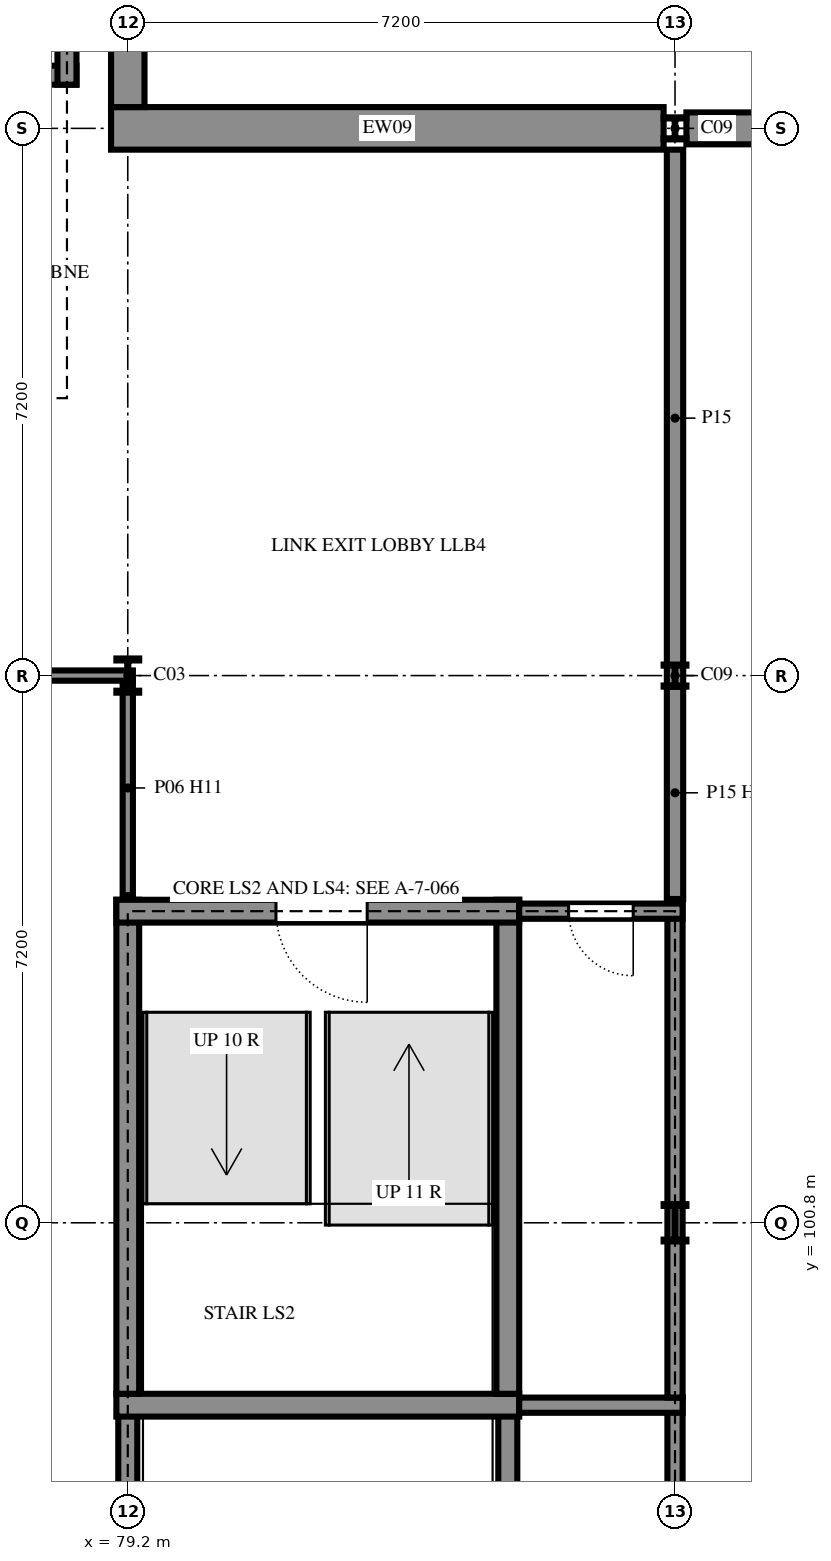
"""IFC4 building model, lengths in metres.
Left out: names, types, materials, properties, quantities, classifications, styles, units other than length and angle.
Written with IfcOpenShell. Run it as: python <this file> out.ifc"""

import sys

from ifc_helpers import new_model, si_unit, direction, frame, frame_2d, origin, origin_2d, place, context, subcontext, project, spatial, rectangle, i_section, extrude, element, fill, save


model = new_model("IFC4")
c1 = context("Model", 3, precision=1e-05, world=origin(), true_north=direction((0.0, 1.0)))
c2 = subcontext(c1, "Body", "Model", "MODEL_VIEW")
j1 = project(units=[si_unit("LENGTHUNIT", "METRE"), si_unit("PLANEANGLEUNIT", "RADIAN")], contexts=[c1])
p1 = place(None, origin())
s1 = spatial("IfcSite", under=j1, at=p1, CompositionType="ELEMENT")
p2 = place(p1, origin())
s2 = spatial("IfcBuilding", under=s1, at=p2, CompositionType="ELEMENT")
p3 = place(p2, frame((0.0, 0.0, 10.8)))
s3 = spatial("IfcBuildingStorey", under=s2, at=p3, CompositionType="ELEMENT", Elevation=10.8)
p4 = place(p3, frame((79.2, 108.0, 0.0), z_axis=(0.0, 0.0, 1.0), x_axis=(1.0, 0.0, 0.0)))
e1 = element("IfcColumn", 1, at=p4, inside=s3, PredefinedType="COLUMN", context=c2, shape_type="SweptSolid", body=[
    extrude(i_section(OverallWidth=0.3, OverallDepth=0.45, WebThickness=0.014, FlangeThickness=0.026, FilletRadius=0.027, at=origin_2d()), origin(), (0.0, 0.0, 1.0), 3.6),
])
p5 = place(p3, frame((86.4, 100.8, 0.0), z_axis=(0.0, 0.0, 1.0), x_axis=(1.0, 0.0, 0.0)))
e2 = element("IfcColumn", 2, at=p5, inside=s3, PredefinedType="COLUMN", context=c2, shape_type="SweptSolid", body=[
    extrude(i_section(OverallWidth=0.3, OverallDepth=0.49, WebThickness=0.012, FlangeThickness=0.023, FilletRadius=0.027, at=origin_2d()), origin(), (0.0, 0.0, 1.0), 3.6),
])
for number, where, z_axis, x_axis in (
    (3, (86.4, 108.0, 0.0), (0.0, 0.0, 1.0), (1.0, 0.0, 0.0)),
    (4, (86.4, 115.2, 0.0), (0.0, 0.0, 1.0), (1.0, 0.0, 0.0)),
):
    element("IfcColumn", number, at=place(p3, frame(where, z_axis=z_axis, x_axis=x_axis)), inside=s3, PredefinedType="COLUMN", context=c2, shape_type="SweptSolid", body=[
        extrude(i_section(OverallWidth=0.3, OverallDepth=0.29, WebThickness=0.009, FlangeThickness=0.014, FilletRadius=0.027, at=origin_2d()), origin(), (0.0, 0.0, 1.0), 3.6),
    ])
p6 = place(p3, frame((84.2, 91.775, 0.0), z_axis=(0.0, 0.0, 1.0), x_axis=(0.0, 1.0, 0.0)))
e5 = element("IfcWall", 5, at=p6, inside=s3, PredefinedType="SHEAR", context=c2, shape_type="SweptSolid", body=[
    extrude(rectangle(XDim=6.775, YDim=0.25, at=frame_2d((3.388, 0.0))), origin(), (0.0, 0.0, 1.0), 3.6),
])
p7 = place(p3, frame((86.4, 91.8, 0.0), z_axis=(0.0, 0.0, 1.0), x_axis=(0.0, 1.0, 0.0)))
e6 = element("IfcWall", 6, at=p7, inside=s3, PredefinedType="SHEAR", context=c2, shape_type="SweptSolid", body=[
    extrude(rectangle(XDim=6.7, YDim=0.2, at=frame_2d((3.35, 0.0))), origin(), (0.0, 0.0, 1.0), 3.6),
])
p8 = place(p3, frame((79.2, 98.55, 0.0), z_axis=(0.0, 0.0, 1.0), x_axis=(0.0, -1.0, 0.0)))
e7 = element("IfcWall", 7, at=p8, inside=s3, PredefinedType="SHEAR", context=c2, shape_type="SweptSolid", body=[
    extrude(rectangle(XDim=6.775, YDim=0.25, at=frame_2d((3.388, 0.0))), origin(), (0.0, 0.0, 1.0), 3.6),
])
p9 = place(p3, frame((84.35, 98.4, 0.0), z_axis=(0.0, 0.0, 1.0), x_axis=(-1.0, 0.0, 0.0)))
e8 = element("IfcWall", 8, at=p9, inside=s3, PredefinedType="SHEAR", context=c2, shape_type="SweptSolid", body=[
    extrude(rectangle(XDim=5.3, YDim=0.3, at=frame_2d((2.65, 0.0))), origin(), (0.0, 0.0, 1.0), 3.6),
])
p10 = place(p3, frame((84.35, 98.4, 0.0), z_axis=(0.0, 0.0, 1.0), x_axis=(1.0, 0.0, 0.0)))
e9 = element("IfcWall", 9, at=p10, inside=s3, PredefinedType="SHEAR", context=c2, shape_type="SweptSolid", body=[
    extrude(rectangle(XDim=2.15, YDim=0.2, at=frame_2d((1.075, 0.0))), origin(), (0.0, 0.0, 1.0), 3.6),
])
p11 = place(p3, frame((84.2, 98.55, 0.0), z_axis=(0.0, 0.0, 1.0), x_axis=(0.0, 1.0, 0.0)))
e10 = element("IfcWall", 10, at=p11, inside=s3, PredefinedType="SHEAR", context=c2, shape_type="SweptSolid", body=[
    extrude(rectangle(XDim=6.5, YDim=0.3, at=frame_2d((3.25, 0.0))), origin(), (0.0, 0.0, 1.0), 3.6),
])
p12 = place(p3, frame((86.4, 98.5, 0.0), z_axis=(0.0, 0.0, 1.0), x_axis=(0.0, 1.0, 0.0)))
e11 = element("IfcWall", 11, at=p12, inside=s3, PredefinedType="SHEAR", context=c2, shape_type="SweptSolid", body=[
    extrude(rectangle(XDim=6.5, YDim=0.2, at=frame_2d((3.25, 0.0))), origin(), (0.0, 0.0, 1.0), 3.6),
])
p13 = place(p3, frame((79.2, 105.05, 0.0), z_axis=(0.0, 0.0, 1.0), x_axis=(0.0, -1.0, 0.0)))
e12 = element("IfcWall", 12, at=p13, inside=s3, PredefinedType="SHEAR", context=c2, shape_type="SweptSolid", body=[
    extrude(rectangle(XDim=6.5, YDim=0.3, at=frame_2d((3.25, 0.0))), origin(), (0.0, 0.0, 1.0), 3.6),
])
p14 = place(p3, frame((84.35, 104.9, 0.0), z_axis=(0.0, 0.0, 1.0), x_axis=(-1.0, 0.0, 0.0)))
e13 = element("IfcWall", 13, at=p14, inside=s3, PredefinedType="SHEAR", context=c2, shape_type="SweptSolid", body=[
    extrude(rectangle(XDim=5.3, YDim=0.3, at=frame_2d((2.65, 0.0))), origin(), (0.0, 0.0, 1.0), 3.6),
])
p15 = place(p14, frame((2.0, 0.0, 0.0)))
e14 = element("IfcOpeningElement", 14, at=p15, cuts=e13, PredefinedType="OPENING", context=c2, shape_type="SweptSolid", body=[
    extrude(rectangle(XDim=1.2, YDim=2.4, at=frame_2d((0.6, 1.2))), frame((0.0, 0.16, 0.0), z_axis=(0.0, -1.0, 0.0), x_axis=(1.0, 0.0, 0.0)), (0.0, 0.0, 1.0), 0.32),
])
p16 = place(p3, frame((86.5, 104.9, 0.0), z_axis=(0.0, 0.0, 1.0), x_axis=(-1.0, 0.0, 0.0)))
e15 = element("IfcWall", 15, at=p16, inside=s3, PredefinedType="SHEAR", context=c2, shape_type="SweptSolid", body=[
    extrude(rectangle(XDim=2.15, YDim=0.2, at=frame_2d((1.075, 0.0))), origin(), (0.0, 0.0, 1.0), 3.6),
])
p17 = place(p16, frame((0.65, 0.0, 0.0)))
e16 = element("IfcOpeningElement", 16, at=p17, cuts=e15, PredefinedType="OPENING", context=c2, shape_type="SweptSolid", body=[
    extrude(rectangle(XDim=0.85, YDim=2.1, at=frame_2d((0.425, 1.05))), frame((0.0, 0.11, 0.0), z_axis=(0.0, -1.0, 0.0), x_axis=(1.0, 0.0, 0.0)), (0.0, 0.0, 1.0), 0.22),
])
p18 = place(p3, frame((73.525, 115.9, 0.0), z_axis=(0.0, 0.0, 1.0), x_axis=(1.0, 0.0, 0.0)))
e17 = element("IfcWall", 17, at=p18, inside=s3, PredefinedType="SHEAR", context=c2, shape_type="SweptSolid", body=[
    extrude(rectangle(XDim=5.0, YDim=0.25, at=frame_2d((2.5, 0.0))), origin(), (0.0, 0.0, 1.0), 3.6),
])
p19 = place(p18, frame((1.825, 0.0, 0.0)))
e18 = element("IfcOpeningElement", 18, at=p19, cuts=e17, PredefinedType="OPENING", context=c2, shape_type="SweptSolid", body=[
    extrude(rectangle(XDim=1.2, YDim=2.4, at=frame_2d((0.6, 1.2))), frame((0.0, 0.135, 0.0), z_axis=(0.0, -1.0, 0.0), x_axis=(1.0, 0.0, 0.0)), (0.0, 0.0, 1.0), 0.27),
])
p20 = place(p3, frame((78.4, 115.775, 0.0), z_axis=(0.0, 0.0, 1.0), x_axis=(0.0, 1.0, 0.0)))
e19 = element("IfcWall", 19, at=p20, inside=s3, PredefinedType="SHEAR", context=c2, shape_type="SweptSolid", body=[
    extrude(rectangle(XDim=6.75, YDim=0.25, at=frame_2d((3.375, 0.0))), origin(), (0.0, 0.0, 1.0), 3.6),
])
p21 = place(p3, frame((93.45, 115.2, 0.0), z_axis=(0.0, 0.0, 1.0), x_axis=(-1.0, 0.0, 0.0)))
e20 = element("IfcWall", 20, at=p21, inside=s3, PredefinedType="SOLIDWALL", context=c2, shape_type="SweptSolid", body=[
    extrude(rectangle(XDim=6.9, YDim=0.42, at=frame_2d((3.45, 0.0))), origin(), (0.0, 0.0, 1.0), 3.6),
])
p22 = place(p21, frame((1.65, 0.0, 1.2)))
e21 = element("IfcOpeningElement", 21, at=p22, cuts=e20, PredefinedType="OPENING", context=c2, shape_type="SweptSolid", body=[
    extrude(rectangle(XDim=3.6, YDim=1.2, at=frame_2d((1.8, 0.6))), frame((0.0, 0.22, 0.0), z_axis=(0.0, -1.0, 0.0), x_axis=(1.0, 0.0, 0.0)), (0.0, 0.0, 1.0), 0.44),
])
p23 = place(p3, frame((86.25, 115.2, 0.0), z_axis=(0.0, 0.0, 1.0), x_axis=(-1.0, 0.0, 0.0)))
e22 = element("IfcWall", 22, at=p23, inside=s3, PredefinedType="SOLIDWALL", context=c2, shape_type="SweptSolid", body=[
    extrude(rectangle(XDim=7.27, YDim=0.56, at=frame_2d((3.635, 0.0))), origin(), (0.0, 0.0, 1.0), 3.12),
])
p24 = place(p3, frame((79.2, 115.48, 0.0), z_axis=(0.0, 0.0, 1.0), x_axis=(0.0, 1.0, 0.0)))
e23 = element("IfcWall", 23, at=p24, inside=s3, PredefinedType="SOLIDWALL", context=c2, shape_type="SweptSolid", body=[
    extrude(rectangle(XDim=6.704, YDim=0.44, at=frame_2d((3.352, 0.0))), origin(), (0.0, 0.0, 1.0), 2.82),
])
p25 = place(p3, frame((79.2, 107.933, 0.0), z_axis=(0.0, 0.0, 1.0), x_axis=(0.0, -1.0, 0.0)))
e24 = element("IfcWall", 24, at=p25, inside=s3, PredefinedType="PARTITIONING", context=c2, shape_type="SweptSolid", body=[
    extrude(rectangle(XDim=2.823, YDim=0.135, at=frame_2d((1.411, 0.0))), origin(), (0.0, 0.0, 1.0), 3.22),
])
p26 = place(p3, frame((86.4, 105.06, 0.0), z_axis=(0.0, 0.0, 1.0), x_axis=(0.0, 1.0, 0.0)))
e25 = element("IfcWall", 25, at=p26, inside=s3, PredefinedType="PARTITIONING", context=c2, shape_type="SweptSolid", body=[
    extrude(rectangle(XDim=2.795, YDim=0.215, at=frame_2d((1.397, 0.0))), origin(), (0.0, 0.0, 1.0), 3.6),
])
p27 = place(p3, frame((71.333, 108.0, 0.0), z_axis=(0.0, 0.0, 1.0), x_axis=(1.0, 0.0, 0.0)))
e26 = element("IfcWall", 26, at=p27, inside=s3, PredefinedType="PARTITIONING", context=c2, shape_type="SweptSolid", body=[
    extrude(rectangle(XDim=7.935, YDim=0.135, at=frame_2d((3.968, 0.0))), origin(), (0.0, 0.0, 1.0), 2.82),
])
p28 = place(p3, frame((86.4, 107.855, 0.0), z_axis=(0.0, 0.0, 1.0), x_axis=(0.0, 1.0, 0.0)))
e27 = element("IfcWall", 27, at=p28, inside=s3, PredefinedType="PARTITIONING", context=c2, shape_type="SweptSolid", body=[
    extrude(rectangle(XDim=7.065, YDim=0.215, at=frame_2d((3.532, 0.0))), origin(), (0.0, 0.0, 1.0), 3.12),
])
p29 = place(p15, origin())
e28 = element("IfcDoor", 28, at=p29, inside=s3, OperationType="SINGLE_SWING_RIGHT", PredefinedType="DOOR", context=c2, shape_type="SweptSolid", body=[
    extrude(rectangle(XDim=1.2, YDim=2.4, at=frame_2d((0.6, 1.2))), frame((0.0, 0.025, 0.0), z_axis=(0.0, -1.0, 0.0), x_axis=(1.0, 0.0, 0.0)), (0.0, 0.0, 1.0), 0.05),
])
fill(e14, e28)
p30 = place(p17, origin())
e29 = element("IfcDoor", 29, at=p30, inside=s3, OperationType="SINGLE_SWING_RIGHT", PredefinedType="DOOR", context=c2, shape_type="SweptSolid", body=[
    extrude(rectangle(XDim=0.85, YDim=2.1, at=frame_2d((0.425, 1.05))), frame((0.0, 0.025, 0.0), z_axis=(0.0, -1.0, 0.0), x_axis=(1.0, 0.0, 0.0)), (0.0, 0.0, 1.0), 0.05),
])
fill(e16, e29)
save(model, sys.argv[1])
